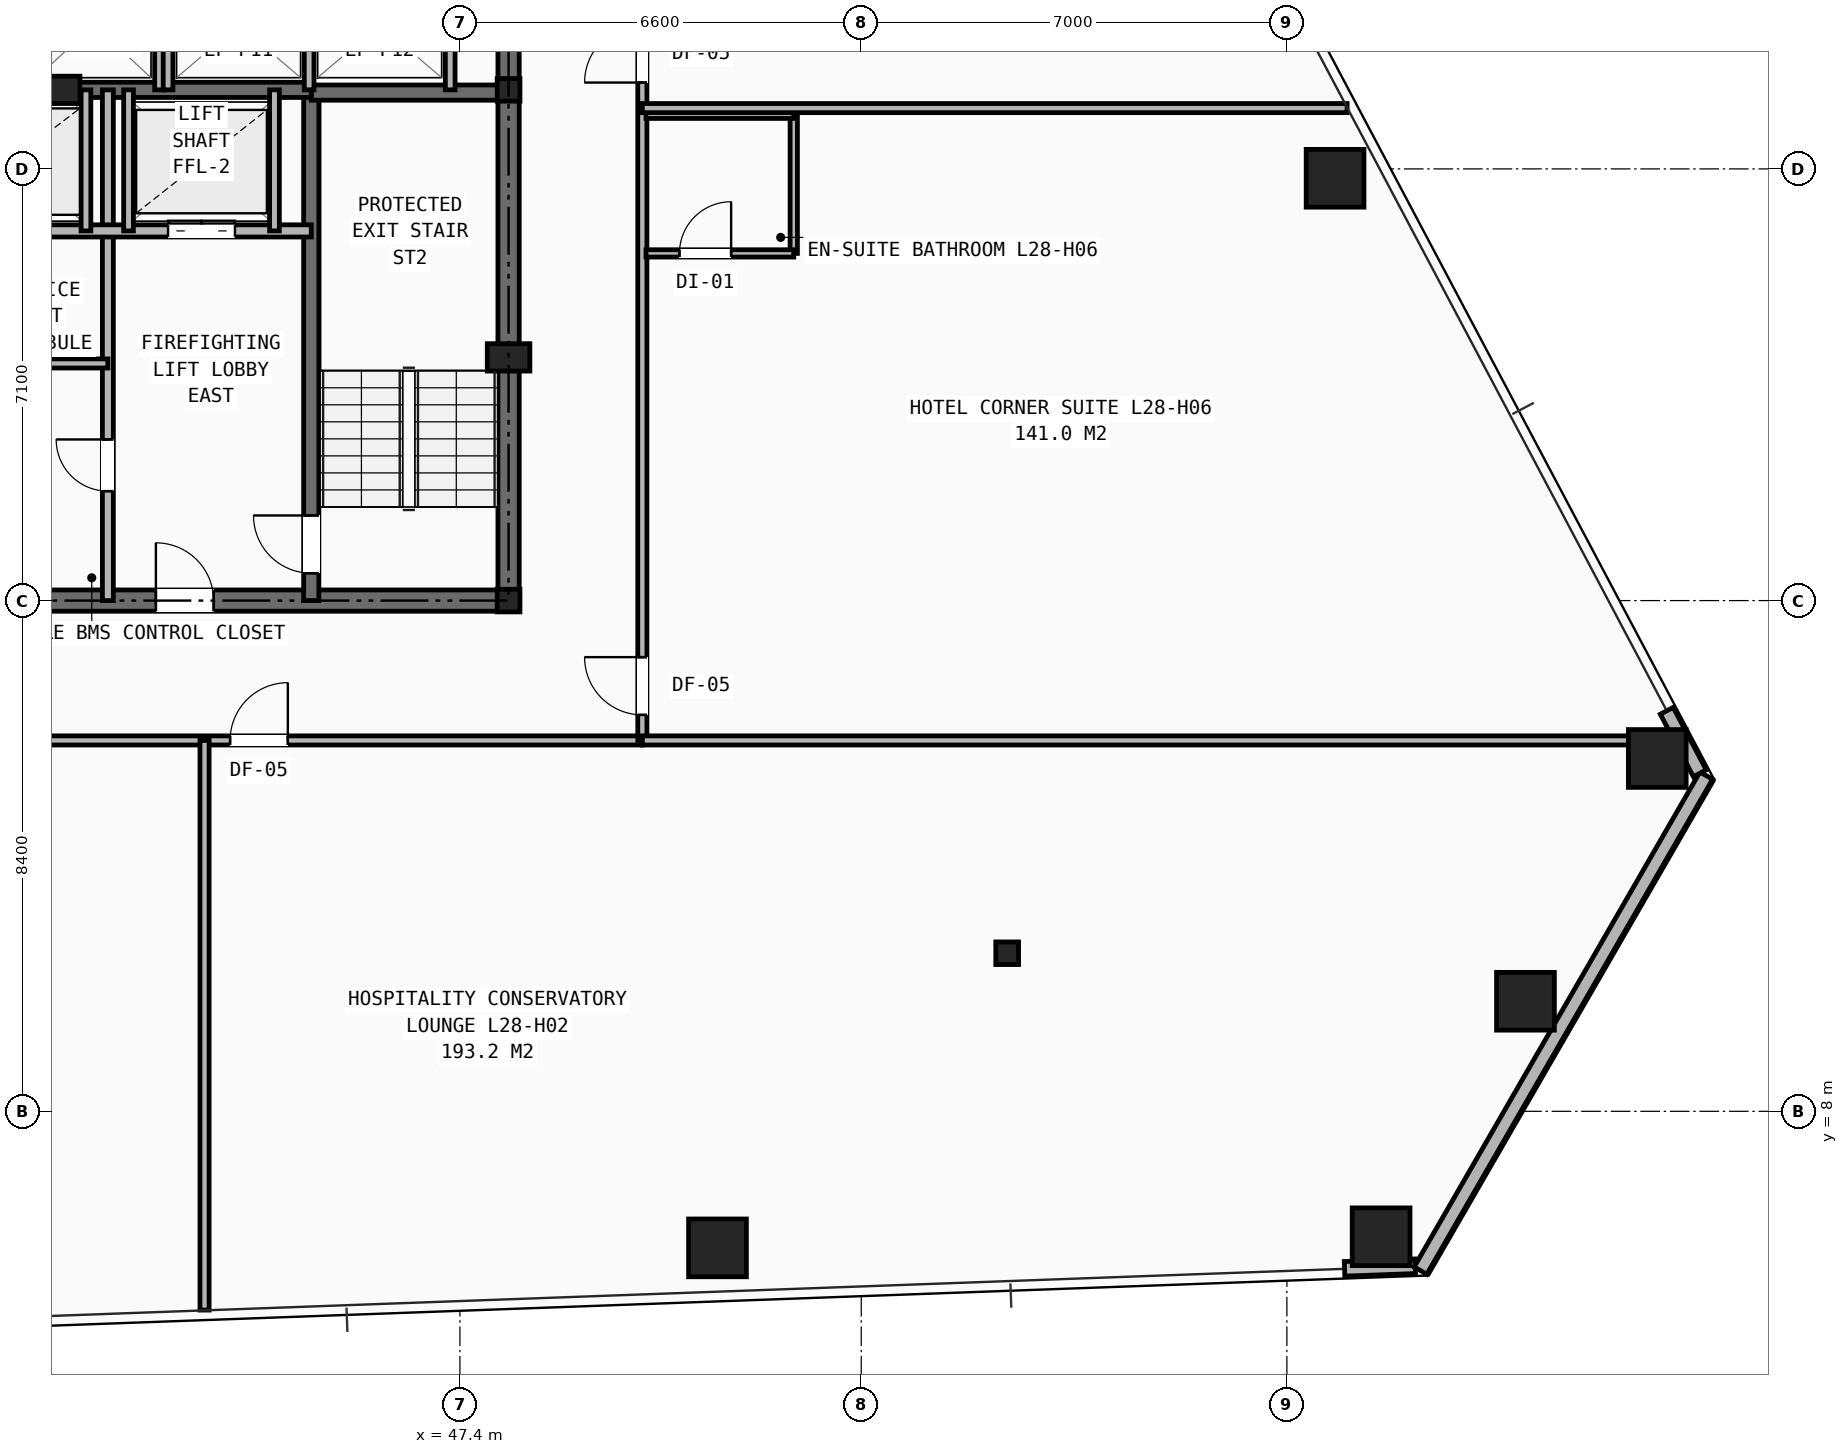
"""IFC4 building model, lengths in metres.
Left out: names, types, materials, properties, quantities, classifications, styles, units other than length and angle.
Written with IfcOpenShell. Run it as: python <this file> out.ifc"""

import sys

from ifc_helpers import new_model, si_unit, direction, frame, frame_2d, origin, origin_2d, place, context, subcontext, project, spatial, rectangle, hollow_rectangle, i_section, extrude, element, fill, save


model = new_model("IFC4")
c1 = context("Model", 3, precision=1e-05, world=origin(), true_north=direction((0.0, 1.0)))
c2 = subcontext(c1, "Body", "Model", "MODEL_VIEW")
j1 = project(units=[si_unit("LENGTHUNIT", "METRE"), si_unit("PLANEANGLEUNIT", "RADIAN")], contexts=[c1])
p1 = place(None, origin())
s1 = spatial("IfcSite", under=j1, at=p1, CompositionType="ELEMENT")
p2 = place(p1, origin())
s2 = spatial("IfcBuilding", under=s1, at=p2, CompositionType="ELEMENT")
p3 = place(p2, frame((0.0, 0.0, 99.0)))
s3 = spatial("IfcBuildingStorey", under=s2, at=p3, CompositionType="ELEMENT", Elevation=99.0)
for number, where, z_axis, x_axis in (
    (1, (48.2, 16.4, 0.0), (0.0, 0.0, 1.0), (1.0, 0.0, 0.0)),
    (2, (48.2, 24.8, 0.0), (0.0, 0.0, 1.0), (1.0, 0.0, 0.0)),
    (3, (56.4, 10.6, 0.0), (0.0, 0.0, 1.0), (1.0, 0.0, 0.0)),
):
    element("IfcColumn", number, at=place(p3, frame(where, z_axis=z_axis, x_axis=x_axis)), inside=s3, PredefinedType="COLUMN", context=c2, shape_type="SweptSolid", body=[
        extrude(i_section(OverallWidth=0.374, OverallDepth=0.372, WebThickness=0.016, FlangeThickness=0.026, at=origin_2d()), origin(), (0.0, 0.0, 1.0), 3.2),
    ])
for number, where, z_axis, x_axis in (
    (4, (48.2, 20.4, 0.0), (0.0, 0.0, 1.0), (1.0, 0.0, 0.0)),
    (5, (40.8, 24.8, 0.0), (0.0, 0.0, 1.0), (1.0, 0.0, 0.0)),
):
    element("IfcColumn", number, at=place(p3, frame(where, z_axis=z_axis, x_axis=x_axis)), inside=s3, PredefinedType="PILASTER", context=c2, shape_type="SweptSolid", body=[
        extrude(rectangle(XDim=0.7, YDim=0.45, at=origin_2d()), origin(), (0.0, 0.0, 1.0), 3.2),
    ])
for number, where, z_axis, x_axis in (
    (6, (51.636, 5.754, 0.0), (0.0, 0.0, 1.0), (1.0, 0.0, 0.0)),
    (7, (62.549, 5.937, 0.0), (0.0, 0.0, 1.0), (1.0, 0.0, 0.0)),
    (8, (64.924, 9.81, 0.0), (0.0, 0.0, 1.0), (1.0, 0.0, 0.0)),
    (9, (67.091, 13.803, 0.0), (0.0, 0.0, 1.0), (1.0, 0.0, 0.0)),
    (10, (61.792, 23.346, 0.0), (0.0, 0.0, 1.0), (1.0, 0.0, 0.0)),
):
    element("IfcColumn", number, at=place(p3, frame(where, z_axis=z_axis, x_axis=x_axis)), inside=s3, PredefinedType="COLUMN", context=c2, shape_type="SweptSolid", body=[
        extrude(hollow_rectangle(XDim=0.95, YDim=0.95, WallThickness=0.065, at=origin_2d()), origin(), (0.0, 0.0, 1.0), 3.2),
    ])
p4 = place(p3, frame((61.948, 5.41, 0.0), z_axis=(0.0, 0.0, 1.0), x_axis=(0.999339636621, 0.036335804358, 0.0)))
e11 = element("IfcWall", 11, at=p4, inside=s3, PredefinedType="SHEAR", context=c2, shape_type="SweptSolid", body=[
    extrude(rectangle(XDim=1.162, YDim=0.24, at=frame_2d((0.581, 0.0))), origin(), (0.0, 0.0, 1.0), 2.253),
])
p5 = place(p3, frame((67.897, 13.521, 0.0), z_axis=(0.0, 0.0, 1.0), x_axis=(-0.499996739618, -0.866027286158, 0.0)))
e12 = element("IfcWall", 12, at=p5, inside=s3, PredefinedType="SHEAR", context=c2, shape_type="SweptSolid", body=[
    extrude(rectangle(XDim=9.4, YDim=0.24, at=frame_2d((4.7, 0.0))), origin(), (0.0, 0.0, 1.0), 2.253),
])
p6 = place(p3, frame((67.792, 13.56, 0.0), z_axis=(0.0, 0.0, 1.0), x_axis=(-0.468090329887, 0.883680622774, 0.0)))
e13 = element("IfcWall", 13, at=p6, inside=s3, PredefinedType="SHEAR", context=c2, shape_type="SweptSolid", body=[
    extrude(rectangle(XDim=1.163, YDim=0.24, at=frame_2d((0.581, 0.0))), origin(), (0.0, 0.0, 1.0), 2.253),
])
p7 = place(p3, frame((31.8, 16.4, 0.0), z_axis=(0.0, 0.0, 1.0), x_axis=(1.0, 0.0, 0.0)))
e14 = element("IfcWall", 14, at=p7, inside=s3, PredefinedType="SHEAR", context=c2, shape_type="SweptSolid", body=[
    extrude(rectangle(XDim=16.4, YDim=0.35, at=frame_2d((8.2, 0.0))), origin(), (0.0, 0.0, 1.0), 2.97),
])
p8 = place(p7, frame((4.2, 0.0, 0.0)))
e15 = element("IfcOpeningElement", 15, at=p8, cuts=e14, PredefinedType="OPENING", context=c2, shape_type="SweptSolid", body=[
    extrude(rectangle(XDim=0.95, YDim=2.1, at=frame_2d((0.475, 1.05))), frame((0.0, 0.185, 0.0), z_axis=(0.0, -1.0, 0.0), x_axis=(1.0, 0.0, 0.0)), (0.0, 0.0, 1.0), 0.37),
])
p9 = place(p7, frame((10.6, 0.0, 0.0)))
e16 = element("IfcOpeningElement", 16, at=p9, cuts=e14, PredefinedType="OPENING", context=c2, shape_type="SweptSolid", body=[
    extrude(rectangle(XDim=0.95, YDim=2.1, at=frame_2d((0.475, 1.05))), frame((0.0, 0.185, 0.0), z_axis=(0.0, -1.0, 0.0), x_axis=(1.0, 0.0, 0.0)), (0.0, 0.0, 1.0), 0.37),
])
p10 = place(p3, frame((48.2, 16.4, 0.0), z_axis=(0.0, 0.0, 1.0), x_axis=(0.0, 1.0, 0.0)))
e17 = element("IfcWall", 17, at=p10, inside=s3, PredefinedType="SHEAR", context=c2, shape_type="SweptSolid", body=[
    extrude(rectangle(XDim=14.8, YDim=0.35, at=frame_2d((7.4, 0.0))), origin(), (0.0, 0.0, 1.0), 2.97),
])
p11 = place(p10, frame((11.0, 0.0, 0.0)))
e18 = element("IfcOpeningElement", 18, at=p11, cuts=e17, PredefinedType="OPENING", context=c2, shape_type="SweptSolid", body=[
    extrude(rectangle(XDim=1.1, YDim=2.15, at=frame_2d((0.55, 1.075))), frame((0.0, 0.185, 0.0), z_axis=(0.0, -1.0, 0.0), x_axis=(1.0, 0.0, 0.0)), (0.0, 0.0, 1.0), 0.37),
])
p12 = place(p3, frame((44.955, 16.4, 0.0), z_axis=(0.0, 0.0, 1.0), x_axis=(0.0, 1.0, 0.0)))
e19 = element("IfcWall", 19, at=p12, inside=s3, PredefinedType="SHEAR", context=c2, shape_type="SweptSolid", body=[
    extrude(rectangle(XDim=8.4, YDim=0.25, at=frame_2d((4.2, 0.0))), origin(), (0.0, 0.0, 1.0), 2.97),
])
p13 = place(p12, frame((0.45, 0.0, 0.0)))
e20 = element("IfcOpeningElement", 20, at=p13, cuts=e19, PredefinedType="OPENING", context=c2, shape_type="SweptSolid", body=[
    extrude(rectangle(XDim=0.95, YDim=2.1, at=frame_2d((0.475, 1.05))), frame((0.0, 0.135, 0.0), z_axis=(0.0, -1.0, 0.0), x_axis=(1.0, 0.0, 0.0)), (0.0, 0.0, 1.0), 0.27),
])
p14 = place(p3, frame((44.955, 24.755, 0.0), z_axis=(0.0, 0.0, 1.0), x_axis=(1.0, 0.0, 0.0)))
e21 = element("IfcWall", 21, at=p14, inside=s3, PredefinedType="SHEAR", context=c2, shape_type="SweptSolid", body=[
    extrude(rectangle(XDim=3.245, YDim=0.25, at=frame_2d((1.623, 0.0))), origin(), (0.0, 0.0, 1.0), 2.97),
])
p15 = place(p3, frame((35.045, 24.8, 0.0), z_axis=(0.0, 0.0, 1.0), x_axis=(1.0, 0.0, 0.0)))
e22 = element("IfcWall", 22, at=p15, inside=s3, PredefinedType="SHEAR", context=c2, shape_type="SweptSolid", body=[
    extrude(rectangle(XDim=9.91, YDim=0.25, at=frame_2d((4.955, 0.0))), origin(), (0.0, 0.0, 1.0), 2.97),
])
p16 = place(p3, frame((41.61, 16.4, 0.0), z_axis=(0.0, 0.0, 1.0), x_axis=(0.0, 1.0, 0.0)))
e23 = element("IfcWall", 23, at=p16, inside=s3, PredefinedType="PARTITIONING", context=c2, shape_type="SweptSolid", body=[
    extrude(rectangle(XDim=8.4, YDim=0.18, at=frame_2d((4.2, 0.0))), origin(), (0.0, 0.0, 1.0), 2.421),
])
p17 = place(p16, frame((1.8, 0.0, 0.0)))
e24 = element("IfcOpeningElement", 24, at=p17, cuts=e23, PredefinedType="OPENING", context=c2, shape_type="SweptSolid", body=[
    extrude(rectangle(XDim=0.85, YDim=2.05, at=frame_2d((0.425, 1.025))), frame((0.0, 0.1, 0.0), z_axis=(0.0, -1.0, 0.0), x_axis=(1.0, 0.0, 0.0)), (0.0, 0.0, 1.0), 0.2),
])
p18 = place(p3, frame((35.045, 22.48, 0.0), z_axis=(0.0, 0.0, 1.0), x_axis=(1.0, 0.0, 0.0)))
e25 = element("IfcWall", 25, at=p18, inside=s3, PredefinedType="SOLIDWALL", context=c2, shape_type="SweptSolid", body=[
    extrude(rectangle(XDim=9.91, YDim=0.2, at=frame_2d((4.955, 0.0))), origin(), (0.0, 0.0, 1.0), 2.97),
])
p19 = place(p18, frame((1.255, 0.0, 0.0)))
e26 = element("IfcOpeningElement", 26, at=p19, cuts=e25, PredefinedType="OPENING", context=c2, shape_type="SweptSolid", body=[
    extrude(rectangle(XDim=1.1, YDim=2.15, at=frame_2d((0.55, 1.075))), frame((0.0, 0.11, 0.0), z_axis=(0.0, -1.0, 0.0), x_axis=(1.0, 0.0, 0.0)), (0.0, 0.0, 1.0), 0.22),
])
p20 = place(p18, frame((7.555, 0.0, 0.0)))
e27 = element("IfcOpeningElement", 27, at=p20, cuts=e25, PredefinedType="OPENING", context=c2, shape_type="SweptSolid", body=[
    extrude(rectangle(XDim=1.1, YDim=2.15, at=frame_2d((0.55, 1.075))), frame((0.0, 0.11, 0.0), z_axis=(0.0, -1.0, 0.0), x_axis=(1.0, 0.0, 0.0)), (0.0, 0.0, 1.0), 0.22),
])
p21 = place(p18, frame((4.405, 0.0, 0.0)))
e28 = element("IfcOpeningElement", 28, at=p21, cuts=e25, PredefinedType="OPENING", context=c2, shape_type="SweptSolid", body=[
    extrude(rectangle(XDim=1.1, YDim=2.15, at=frame_2d((0.55, 1.075))), frame((0.0, 0.11, 0.0), z_axis=(0.0, -1.0, 0.0), x_axis=(1.0, 0.0, 0.0)), (0.0, 0.0, 1.0), 0.22),
])
p22 = place(p3, frame((38.39, 20.3, 0.0), z_axis=(0.0, 0.0, 1.0), x_axis=(1.0, 0.0, 0.0)))
e29 = element("IfcWall", 29, at=p22, inside=s3, PredefinedType="PARTITIONING", context=c2, shape_type="SweptSolid", body=[
    extrude(rectangle(XDim=3.22, YDim=0.15, at=frame_2d((1.61, 0.0))), origin(), (0.0, 0.0, 1.0), 2.97),
])
for number, where, z_axis, x_axis in (
    (30, (41.95, 22.48, 0.0), (0.0, 0.0, 1.0), (0.0, 1.0, 0.0)),
    (31, (44.35, 22.48, 0.0), (0.0, 0.0, 1.0), (0.0, 1.0, 0.0)),
    (32, (41.25, 22.48, 0.0), (0.0, 0.0, 1.0), (0.0, 1.0, 0.0)),
):
    element("IfcWall", number, at=place(p3, frame(where, z_axis=z_axis, x_axis=x_axis)), inside=s3, PredefinedType="SOLIDWALL", context=c2, shape_type="SweptSolid", body=[
        extrude(rectangle(XDim=2.32, YDim=0.16, at=frame_2d((1.16, 0.0))), origin(), (0.0, 0.0, 1.0), 2.97),
    ])
for number, where, z_axis, x_axis in (
    (33, (42.46, 24.8, 0.0), (0.0, 0.0, 1.0), (0.0, 1.0, 0.0)),
    (34, (42.6, 24.8, 0.0), (0.0, 0.0, 1.0), (0.0, 1.0, 0.0)),
    (35, (44.92, 24.8, 0.0), (0.0, 0.0, 1.0), (0.0, 1.0, 0.0)),
    (36, (47.24, 24.8, 0.0), (0.0, 0.0, 1.0), (0.0, 1.0, 0.0)),
):
    element("IfcWall", number, at=place(p3, frame(where, z_axis=z_axis, x_axis=x_axis)), inside=s3, PredefinedType="SOLIDWALL", context=c2, shape_type="SweptSolid", body=[
        extrude(rectangle(XDim=2.08, YDim=0.16, at=frame_2d((1.04, 0.0))), origin(), (0.0, 0.0, 1.0), 2.97),
    ])
p23 = place(p3, frame((29.6, 14.1, 0.0), z_axis=(0.0, 0.0, 1.0), x_axis=(1.0, 0.0, 0.0)))
e37 = element("IfcWall", 37, at=p23, inside=s3, PredefinedType="PARTITIONING", context=c2, shape_type="SweptSolid", body=[
    extrude(rectangle(XDim=20.8, YDim=0.15, at=frame_2d((10.4, 0.0))), origin(), (0.0, 0.0, 1.0), 2.181),
])
p24 = place(p23, frame((0.57, 0.0, 0.0)))
e38 = element("IfcOpeningElement", 38, at=p24, cuts=e37, PredefinedType="OPENING", context=c2, shape_type="SweptSolid", body=[
    extrude(rectangle(XDim=0.95, YDim=2.1, at=frame_2d((0.475, 1.05))), frame((0.0, 0.085, 0.0), z_axis=(0.0, -1.0, 0.0), x_axis=(1.0, 0.0, 0.0)), (0.0, 0.0, 1.0), 0.17),
])
p25 = place(p23, frame((14.02, 0.0, 0.0)))
e39 = element("IfcOpeningElement", 39, at=p25, cuts=e37, PredefinedType="OPENING", context=c2, shape_type="SweptSolid", body=[
    extrude(rectangle(XDim=0.95, YDim=2.1, at=frame_2d((0.475, 1.05))), frame((0.0, 0.085, 0.0), z_axis=(0.0, -1.0, 0.0), x_axis=(1.0, 0.0, 0.0)), (0.0, 0.0, 1.0), 0.17),
])
p26 = place(p3, frame((50.4, 14.1, 0.0), z_axis=(0.0, 0.0, 1.0), x_axis=(0.0, 1.0, 0.0)))
e40 = element("IfcWall", 40, at=p26, inside=s3, PredefinedType="PARTITIONING", context=c2, shape_type="SweptSolid", body=[
    extrude(rectangle(XDim=21.9, YDim=0.15, at=frame_2d((10.95, 0.0))), origin(), (0.0, 0.0, 1.0), 2.181),
])
p27 = place(p26, frame((0.42, 0.0, 0.0)))
e41 = element("IfcOpeningElement", 41, at=p27, cuts=e40, PredefinedType="OPENING", context=c2, shape_type="SweptSolid", body=[
    extrude(rectangle(XDim=0.95, YDim=2.1, at=frame_2d((0.475, 1.05))), frame((0.0, 0.085, 0.0), z_axis=(0.0, -1.0, 0.0), x_axis=(1.0, 0.0, 0.0)), (0.0, 0.0, 1.0), 0.17),
])
p28 = place(p26, frame((10.82, 0.0, 0.0)))
e42 = element("IfcOpeningElement", 42, at=p28, cuts=e40, PredefinedType="OPENING", context=c2, shape_type="SweptSolid", body=[
    extrude(rectangle(XDim=0.95, YDim=2.1, at=frame_2d((0.475, 1.05))), frame((0.0, 0.085, 0.0), z_axis=(0.0, -1.0, 0.0), x_axis=(1.0, 0.0, 0.0)), (0.0, 0.0, 1.0), 0.17),
])
p29 = place(p3, frame((43.2, 4.731, 0.0), z_axis=(0.0, 0.0, 1.0), x_axis=(0.0, 1.0, 0.0)))
e43 = element("IfcWall", 43, at=p29, inside=s3, PredefinedType="PARTITIONING", context=c2, shape_type="SweptSolid", body=[
    extrude(rectangle(XDim=9.369, YDim=0.15, at=frame_2d((4.685, 0.0))), origin(), (0.0, 0.0, 1.0), 2.258),
])
p30 = place(p3, frame((50.4, 14.1, 0.0), z_axis=(0.0, 0.0, 1.0), x_axis=(1.0, 0.0, 0.0)))
e44 = element("IfcWall", 44, at=p30, inside=s3, PredefinedType="PARTITIONING", context=c2, shape_type="SweptSolid", body=[
    extrude(rectangle(XDim=17.1, YDim=0.15, at=frame_2d((8.55, 0.0))), origin(), (0.0, 0.0, 1.0), 2.181),
])
p31 = place(p3, frame((52.89, 22.11, 0.0), z_axis=(0.0, 0.0, 1.0), x_axis=(0.0, 1.0, 0.0)))
e45 = element("IfcWall", 45, at=p31, inside=s3, PredefinedType="PARTITIONING", context=c2, shape_type="SweptSolid", body=[
    extrude(rectangle(XDim=2.28, YDim=0.12, at=frame_2d((1.14, 0.0))), origin(), (0.0, 0.0, 1.0), 2.97),
])
p32 = place(p3, frame((50.46, 22.11, 0.0), z_axis=(0.0, 0.0, 1.0), x_axis=(1.0, 0.0, 0.0)))
e46 = element("IfcWall", 46, at=p32, inside=s3, PredefinedType="PARTITIONING", context=c2, shape_type="SweptSolid", body=[
    extrude(rectangle(XDim=2.43, YDim=0.12, at=frame_2d((1.215, 0.0))), origin(), (0.0, 0.0, 1.0), 2.97),
])
p33 = place(p32, frame((0.55, 0.0, 0.0)))
e47 = element("IfcOpeningElement", 47, at=p33, cuts=e46, PredefinedType="OPENING", context=c2, shape_type="SweptSolid", body=[
    extrude(rectangle(XDim=0.85, YDim=2.05, at=frame_2d((0.425, 1.025))), frame((0.0, 0.07, 0.0), z_axis=(0.0, -1.0, 0.0), x_axis=(1.0, 0.0, 0.0)), (0.0, 0.0, 1.0), 0.14),
])
p34 = place(p3, frame((50.46, 24.39, 0.0), z_axis=(0.0, 0.0, 1.0), x_axis=(1.0, 0.0, 0.0)))
e48 = element("IfcWall", 48, at=p34, inside=s3, PredefinedType="PARTITIONING", context=c2, shape_type="SweptSolid", body=[
    extrude(rectangle(XDim=2.43, YDim=0.12, at=frame_2d((1.215, 0.0))), origin(), (0.0, 0.0, 1.0), 2.97),
])
p35 = place(p3, frame((50.4, 24.5, 0.0), z_axis=(0.0, 0.0, 1.0), x_axis=(1.0, 0.0, 0.0)))
e49 = element("IfcWall", 49, at=p35, inside=s3, PredefinedType="PARTITIONING", context=c2, shape_type="SweptSolid", body=[
    extrude(rectangle(XDim=11.59, YDim=0.15, at=frame_2d((5.795, 0.0))), origin(), (0.0, 0.0, 1.0), 2.258),
])
p36 = place(p17, origin())
e50 = element("IfcDoor", 50, at=p36, inside=s3, OperationType="SINGLE_SWING_RIGHT", PredefinedType="DOOR", context=c2, shape_type="SweptSolid", body=[
    extrude(rectangle(XDim=0.85, YDim=2.05, at=frame_2d((0.425, 1.025))), frame((0.0, 0.025, 0.0), z_axis=(0.0, -1.0, 0.0), x_axis=(1.0, 0.0, 0.0)), (0.0, 0.0, 1.0), 0.05),
])
fill(e24, e50)
p37 = place(p13, origin())
e51 = element("IfcDoor", 51, at=p37, inside=s3, OperationType="SINGLE_SWING_RIGHT", PredefinedType="DOOR", context=c2, shape_type="SweptSolid", body=[
    extrude(rectangle(XDim=0.95, YDim=2.1, at=frame_2d((0.475, 1.05))), frame((0.0, 0.025, 0.0), z_axis=(0.0, -1.0, 0.0), x_axis=(1.0, 0.0, 0.0)), (0.0, 0.0, 1.0), 0.05),
])
fill(e20, e51)
p38 = place(p9, origin())
e52 = element("IfcDoor", 52, at=p38, inside=s3, OperationType="SINGLE_SWING_LEFT", PredefinedType="DOOR", context=c2, shape_type="SweptSolid", body=[
    extrude(rectangle(XDim=0.95, YDim=2.1, at=frame_2d((0.475, 1.05))), frame((0.0, 0.025, 0.0), z_axis=(0.0, -1.0, 0.0), x_axis=(1.0, 0.0, 0.0)), (0.0, 0.0, 1.0), 0.05),
])
fill(e16, e52)
p39 = place(p20, origin())
e53 = element("IfcDoor", 53, at=p39, inside=s3, OperationType="DOUBLE_DOOR_SLIDING", PredefinedType="DOOR", context=c2, shape_type="SweptSolid", body=[
    extrude(rectangle(XDim=1.1, YDim=2.15, at=frame_2d((0.55, 1.075))), frame((0.0, 0.025, 0.0), z_axis=(0.0, -1.0, 0.0), x_axis=(1.0, 0.0, 0.0)), (0.0, 0.0, 1.0), 0.05),
])
fill(e27, e53)
p40 = place(p25, origin())
e54 = element("IfcDoor", 54, at=p40, inside=s3, OperationType="SINGLE_SWING_RIGHT", PredefinedType="DOOR", context=c2, shape_type="SweptSolid", body=[
    extrude(rectangle(XDim=0.95, YDim=2.1, at=frame_2d((0.475, 1.05))), frame((0.0, 0.025, 0.0), z_axis=(0.0, -1.0, 0.0), x_axis=(1.0, 0.0, 0.0)), (0.0, 0.0, 1.0), 0.05),
])
fill(e39, e54)
p41 = place(p27, origin())
e55 = element("IfcDoor", 55, at=p41, inside=s3, OperationType="SINGLE_SWING_RIGHT", PredefinedType="DOOR", context=c2, shape_type="SweptSolid", body=[
    extrude(rectangle(XDim=0.95, YDim=2.1, at=frame_2d((0.475, 1.05))), frame((0.0, 0.025, 0.0), z_axis=(0.0, -1.0, 0.0), x_axis=(1.0, 0.0, 0.0)), (0.0, 0.0, 1.0), 0.05),
])
fill(e41, e55)
p42 = place(p33, origin())
e56 = element("IfcDoor", 56, at=p42, inside=s3, OperationType="SINGLE_SWING_RIGHT", PredefinedType="DOOR", context=c2, shape_type="SweptSolid", body=[
    extrude(rectangle(XDim=0.85, YDim=2.05, at=frame_2d((0.425, 1.025))), frame((0.0, 0.025, 0.0), z_axis=(0.0, -1.0, 0.0), x_axis=(1.0, 0.0, 0.0)), (0.0, 0.0, 1.0), 0.05),
])
fill(e47, e56)
p43 = place(p28, origin())
e57 = element("IfcDoor", 57, at=p43, inside=s3, OperationType="SINGLE_SWING_LEFT", PredefinedType="DOOR", context=c2, shape_type="SweptSolid", body=[
    extrude(rectangle(XDim=0.95, YDim=2.1, at=frame_2d((0.475, 1.05))), frame((0.0, 0.025, 0.0), z_axis=(0.0, -1.0, 0.0), x_axis=(1.0, 0.0, 0.0)), (0.0, 0.0, 1.0), 0.05),
])
fill(e42, e57)
save(model, sys.argv[1])
